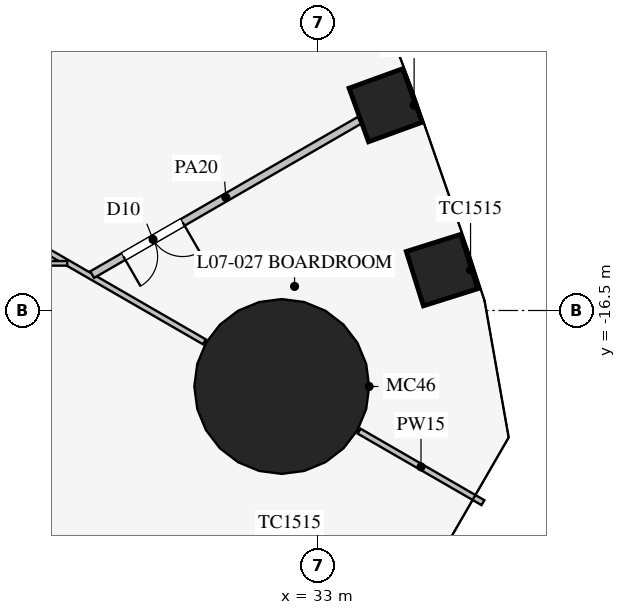
"""IFC4 building model, lengths in metres.
Left out: names, types, materials, properties, quantities, classifications, styles, units other than length and angle.
Written with IfcOpenShell. Run it as: python <this file> out.ifc"""

import sys

from ifc_helpers import new_model, si_unit, direction, frame, frame_2d, origin, origin_2d, place, context, subcontext, project, spatial, rectangle, circle, extrude, element, fill, save


model = new_model("IFC4")
c1 = context("Model", 3, precision=1e-05, world=origin(), true_north=direction((0.0, 1.0)))
c2 = subcontext(c1, "Body", "Model", "MODEL_VIEW")
j1 = project(units=[si_unit("LENGTHUNIT", "METRE"), si_unit("PLANEANGLEUNIT", "RADIAN")], contexts=[c1])
p1 = place(None, origin())
s1 = spatial("IfcSite", under=j1, at=p1, CompositionType="ELEMENT")
p2 = place(p1, origin())
s2 = spatial("IfcBuilding", under=s1, at=p2, CompositionType="ELEMENT")
p3 = place(p2, frame((0.0, 0.0, 33.3)))
s3 = spatial("IfcBuildingStorey", under=s2, at=p3, CompositionType="ELEMENT", Elevation=33.3)
for number, where, z_axis, x_axis in (
    (1, (36.262, -15.438, 0.0), (0.0, 0.0, 1.0), (-0.3, 0.954, 0.0)),
    (2, (34.776, -11.099, 0.0), (0.0, 0.0, 1.0), (-0.342, 0.94, 0.0)),
):
    element("IfcColumn", number, at=place(p3, frame(where, z_axis=z_axis, x_axis=x_axis)), inside=s3, PredefinedType="COLUMN", context=c2, shape_type="SweptSolid", body=[
        extrude(rectangle(XDim=1.5, YDim=1.5, at=origin_2d()), origin(), (0.0, 0.0, 1.0), 4.2),
    ])
p4 = place(p3, frame((32.043, -18.5, 0.0), z_axis=(0.0, 0.0, 1.0), x_axis=(1.0, 0.0, 0.0)))
e3 = element("IfcColumn", 3, at=p4, inside=s3, PredefinedType="COLUMN", context=c2, shape_type="SweptSolid", body=[
    extrude(circle(Radius=2.3, at=origin_2d()), origin(), (0.0, 0.0, 1.0), 4.2),
])
p5 = place(p3, frame((14.203, -8.2, 0.0), z_axis=(0.0, 0.0, 1.0), x_axis=(0.866024965723, -0.500000758745, 0.0)))
e4 = element("IfcWall", 4, at=p5, inside=s3, PredefinedType="PARTITIONING", context=c2, shape_type="SweptSolid", body=[
    extrude(rectangle(XDim=18.25, YDim=0.15, at=frame_2d((9.125, 0.0))), origin(), (0.0, 0.0, 1.0), 2.3),
])
p6 = place(p3, frame((34.078, -19.675, 0.0), z_axis=(0.0, 0.0, 1.0), x_axis=(0.866019247219, -0.500010663332, 0.0)))
e5 = element("IfcWall", 5, at=p6, inside=s3, PredefinedType="PARTITIONING", context=c2, shape_type="SweptSolid", body=[
    extrude(rectangle(XDim=3.764, YDim=0.15, at=frame_2d((1.882, 0.0))), origin(), (0.0, 0.0, 1.0), 2.3),
])
p7 = place(p3, frame((-26.398, -15.26, 0.0), z_axis=(0.0, 0.0, 1.0), x_axis=(1.0, 0.0, 0.0)))
e6 = element("IfcWall", 6, at=p7, inside=s3, PredefinedType="PARTITIONING", context=c2, shape_type="SweptSolid", body=[
    extrude(rectangle(XDim=52.796, YDim=0.12, at=frame_2d((26.398, 0.0))), origin(), (0.0, 0.0, 1.0), 2.9),
])
p8 = place(p7, frame((10.2, 0.0, 0.15)))
e7 = element("IfcOpeningElement", 7, at=p8, cuts=e6, PredefinedType="OPENING", context=c2, shape_type="SweptSolid", body=[
    extrude(rectangle(XDim=1.8, YDim=2.1, at=frame_2d((0.9, 1.05))), frame((0.0, 0.07, 0.0), z_axis=(0.0, -1.0, 0.0), x_axis=(1.0, 0.0, 0.0)), (0.0, 0.0, 1.0), 0.14),
])
p9 = place(p7, frame((40.8, 0.0, 0.15)))
e8 = element("IfcOpeningElement", 8, at=p9, cuts=e6, PredefinedType="OPENING", context=c2, shape_type="SweptSolid", body=[
    extrude(rectangle(XDim=1.8, YDim=2.1, at=frame_2d((0.9, 1.05))), frame((0.0, 0.07, 0.0), z_axis=(0.0, -1.0, 0.0), x_axis=(1.0, 0.0, 0.0)), (0.0, 0.0, 1.0), 0.14),
])
p10 = place(p3, frame((27.055, -15.557, 0.0), z_axis=(0.0, 0.0, 1.0), x_axis=(0.866026445548, 0.499998195608, 0.0)))
e9 = element("IfcWall", 9, at=p10, inside=s3, PredefinedType="PARTITIONING", context=c2, shape_type="SweptSolid", body=[
    extrude(rectangle(XDim=8.124, YDim=0.2, at=frame_2d((4.062, 0.0))), origin(), (0.0, 0.0, 1.0), 2.9),
])
p11 = place(p10, frame((0.95, 0.0, 0.15)))
e10 = element("IfcOpeningElement", 10, at=p11, cuts=e9, PredefinedType="OPENING", context=c2, shape_type="SweptSolid", body=[
    extrude(rectangle(XDim=1.8, YDim=2.1, at=frame_2d((0.9, 1.05))), frame((0.0, 0.11, 0.0), z_axis=(0.0, -1.0, 0.0), x_axis=(1.0, 0.0, 0.0)), (0.0, 0.0, 1.0), 0.22),
])
p12 = place(p11, frame((1.8, 0.0, 0.0), z_axis=(0.0, 0.0, 1.0), x_axis=(-1.0, 0.0, 0.0)))
e11 = element("IfcDoor", 11, at=p12, inside=s3, OperationType="DOUBLE_DOOR_SINGLE_SWING", PredefinedType="DOOR", context=c2, shape_type="SweptSolid", body=[
    extrude(rectangle(XDim=1.8, YDim=2.1, at=frame_2d((0.9, 1.05))), frame((0.0, 0.025, 0.0), z_axis=(0.0, -1.0, 0.0), x_axis=(1.0, 0.0, 0.0)), (0.0, 0.0, 1.0), 0.05),
])
fill(e10, e11)
save(model, sys.argv[1])
